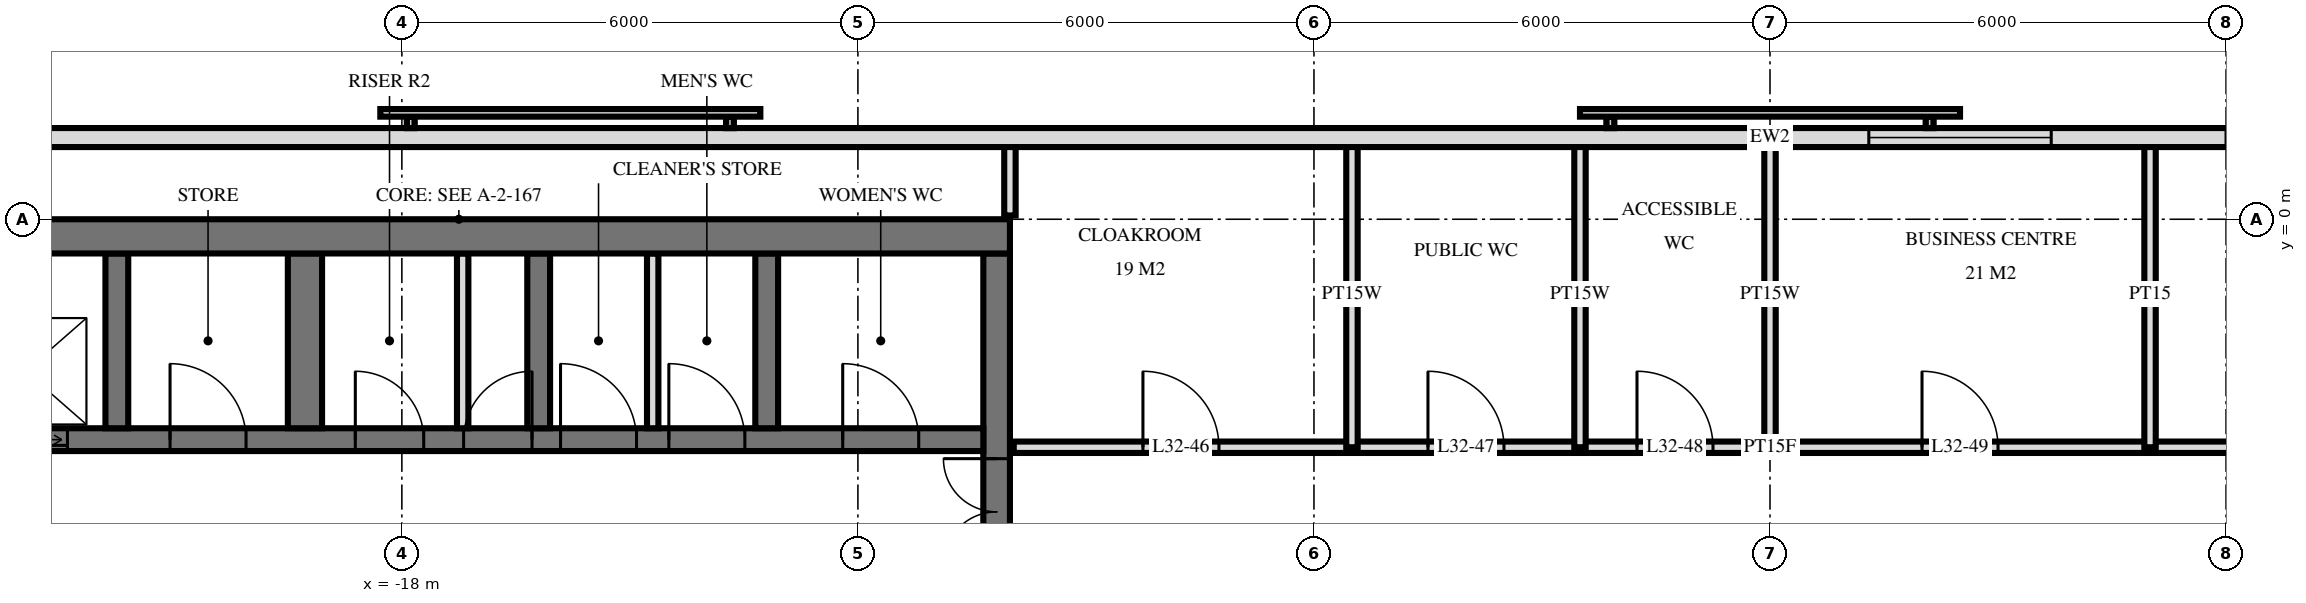
"""IFC4 building model, lengths in metres.
Left out: names, types, materials, properties, quantities, classifications, styles, units other than length and angle.
Written with IfcOpenShell. Run it as: python <this file> out.ifc"""

import sys

from ifc_helpers import new_model, si_unit, direction, frame, frame_2d, origin, place, context, subcontext, project, spatial, rectangle, extrude, element, fill, save


model = new_model("IFC4")
c1 = context("Model", 3, precision=1e-05, world=origin(), true_north=direction((0.0, 1.0)))
c2 = subcontext(c1, "Body", "Model", "MODEL_VIEW")
j1 = project(units=[si_unit("LENGTHUNIT", "METRE"), si_unit("PLANEANGLEUNIT", "RADIAN")], contexts=[c1])
p1 = place(None, origin())
s1 = spatial("IfcSite", under=j1, at=p1, CompositionType="ELEMENT")
p2 = place(p1, origin())
s2 = spatial("IfcBuilding", under=s1, at=p2, CompositionType="ELEMENT")
p3 = place(p2, frame((0.0, 0.0, 127.2)))
s3 = spatial("IfcBuildingStorey", under=s2, at=p3, CompositionType="ELEMENT", Elevation=127.2)
p4 = place(p3, frame((-24.5, -0.225, 0.0), z_axis=(0.0, 0.0, 1.0), x_axis=(1.0, 0.0, 0.0)))
e1 = element("IfcWall", 1, at=p4, inside=s3, PredefinedType="SHEAR", context=c2, shape_type="SweptSolid", body=[
    extrude(rectangle(XDim=14.5, YDim=0.45, at=frame_2d((7.25, 0.0))), origin(), (0.0, 0.0, 1.0), 3.6),
])
p5 = place(p3, frame((-10.175, -14.55, 0.0), z_axis=(0.0, 0.0, 1.0), x_axis=(0.0, 1.0, 0.0)))
e2 = element("IfcWall", 2, at=p5, inside=s3, PredefinedType="SHEAR", context=c2, shape_type="SweptSolid", body=[
    extrude(rectangle(XDim=14.1, YDim=0.35, at=frame_2d((7.05, 0.0))), origin(), (0.0, 0.0, 1.0), 3.6),
])
p6 = place(p5, frame((8.4, 0.0, 0.0)))
e3 = element("IfcOpeningElement", 3, at=p6, cuts=e2, PredefinedType="OPENING", context=c2, shape_type="SweptSolid", body=[
    extrude(rectangle(XDim=1.4, YDim=2.4, at=frame_2d((0.7, 1.2))), frame((0.0, 0.185, 0.0), z_axis=(0.0, -1.0, 0.0), x_axis=(1.0, 0.0, 0.0)), (0.0, 0.0, 1.0), 0.37),
])
p7 = place(p5, frame((10.0, 0.0, 0.0)))
e4 = element("IfcOpeningElement", 4, at=p7, cuts=e2, PredefinedType="OPENING", context=c2, shape_type="SweptSolid", body=[
    extrude(rectangle(XDim=1.4, YDim=2.4, at=frame_2d((0.7, 1.2))), frame((0.0, 0.185, 0.0), z_axis=(0.0, -1.0, 0.0), x_axis=(1.0, 0.0, 0.0)), (0.0, 0.0, 1.0), 0.37),
])
p8 = place(p5, frame((4.0, 0.0, 0.0)))
e5 = element("IfcOpeningElement", 5, at=p8, cuts=e2, PredefinedType="OPENING", context=c2, shape_type="SweptSolid", body=[
    extrude(rectangle(XDim=1.2, YDim=2.1, at=frame_2d((0.6, 1.05))), frame((0.0, 0.185, 0.0), z_axis=(0.0, -1.0, 0.0), x_axis=(1.0, 0.0, 0.0)), (0.0, 0.0, 1.0), 0.37),
])
p9 = place(p3, frame((-24.05, -2.9, 0.0), z_axis=(0.0, 0.0, 1.0), x_axis=(1.0, 0.0, 0.0)))
e6 = element("IfcWall", 6, at=p9, inside=s3, PredefinedType="SHEAR", context=c2, shape_type="SweptSolid", body=[
    extrude(rectangle(XDim=13.7, YDim=0.3, at=frame_2d((6.85, 0.0))), origin(), (0.0, 0.0, 1.0), 3.6),
])
p10 = place(p9, frame((0.55, 0.0, 0.0)))
e7 = element("IfcOpeningElement", 7, at=p10, cuts=e6, PredefinedType="OPENING", context=c2, shape_type="SweptSolid", body=[
    extrude(rectangle(XDim=1.1, YDim=2.1, at=frame_2d((0.55, 1.05))), frame((0.0, 0.16, 0.0), z_axis=(0.0, -1.0, 0.0), x_axis=(1.0, 0.0, 0.0)), (0.0, 0.0, 1.0), 0.32),
])
p11 = place(p9, frame((6.863, 0.0, 0.0)))
e8 = element("IfcOpeningElement", 8, at=p11, cuts=e6, PredefinedType="OPENING", context=c2, shape_type="SweptSolid", body=[
    extrude(rectangle(XDim=0.9, YDim=2.1, at=frame_2d((0.45, 1.05))), frame((0.0, 0.16, 0.0), z_axis=(0.0, -1.0, 0.0), x_axis=(1.0, 0.0, 0.0)), (0.0, 0.0, 1.0), 0.32),
])
p12 = place(p9, frame((5.438, 0.0, 0.0)))
e9 = element("IfcOpeningElement", 9, at=p12, cuts=e6, PredefinedType="OPENING", context=c2, shape_type="SweptSolid", body=[
    extrude(rectangle(XDim=0.9, YDim=2.1, at=frame_2d((0.45, 1.05))), frame((0.0, 0.16, 0.0), z_axis=(0.0, -1.0, 0.0), x_axis=(1.0, 0.0, 0.0)), (0.0, 0.0, 1.0), 0.32),
])
p13 = place(p9, frame((11.85, 0.0, 0.0)))
e10 = element("IfcOpeningElement", 10, at=p13, cuts=e6, PredefinedType="OPENING", context=c2, shape_type="SweptSolid", body=[
    extrude(rectangle(XDim=1.0, YDim=2.1, at=frame_2d((0.5, 1.05))), frame((0.0, 0.16, 0.0), z_axis=(0.0, -1.0, 0.0), x_axis=(1.0, 0.0, 0.0)), (0.0, 0.0, 1.0), 0.32),
])
p14 = place(p9, frame((9.562, 0.0, 0.0)))
e11 = element("IfcOpeningElement", 11, at=p14, cuts=e6, PredefinedType="OPENING", context=c2, shape_type="SweptSolid", body=[
    extrude(rectangle(XDim=1.0, YDim=2.1, at=frame_2d((0.5, 1.05))), frame((0.0, 0.16, 0.0), z_axis=(0.0, -1.0, 0.0), x_axis=(1.0, 0.0, 0.0)), (0.0, 0.0, 1.0), 0.32),
])
p15 = place(p9, frame((8.137, 0.0, 0.0)))
e12 = element("IfcOpeningElement", 12, at=p15, cuts=e6, PredefinedType="OPENING", context=c2, shape_type="SweptSolid", body=[
    extrude(rectangle(XDim=1.0, YDim=2.1, at=frame_2d((0.5, 1.05))), frame((0.0, 0.16, 0.0), z_axis=(0.0, -1.0, 0.0), x_axis=(1.0, 0.0, 0.0)), (0.0, 0.0, 1.0), 0.32),
])
p16 = place(p9, frame((3.0, 0.0, 0.0)))
e13 = element("IfcOpeningElement", 13, at=p16, cuts=e6, PredefinedType="OPENING", context=c2, shape_type="SweptSolid", body=[
    extrude(rectangle(XDim=1.0, YDim=2.1, at=frame_2d((0.5, 1.05))), frame((0.0, 0.16, 0.0), z_axis=(0.0, -1.0, 0.0), x_axis=(1.0, 0.0, 0.0)), (0.0, 0.0, 1.0), 0.32),
])
for number, where, z_axis, x_axis in (
    (14, (-13.2, -2.75, 0.0), (0.0, 0.0, 1.0), (0.0, 1.0, 0.0)),
    (15, (-16.2, -2.75, 0.0), (0.0, 0.0, 1.0), (0.0, 1.0, 0.0)),
):
    element("IfcWall", number, at=place(p3, frame(where, z_axis=z_axis, x_axis=x_axis)), inside=s3, PredefinedType="SHEAR", context=c2, shape_type="SweptSolid", body=[
        extrude(rectangle(XDim=2.3, YDim=0.3, at=frame_2d((1.15, 0.0))), origin(), (0.0, 0.0, 1.0), 3.6),
    ])
p17 = place(p3, frame((-19.275, -2.75, 0.0), z_axis=(0.0, 0.0, 1.0), x_axis=(0.0, 1.0, 0.0)))
e16 = element("IfcWall", 16, at=p17, inside=s3, PredefinedType="SHEAR", context=c2, shape_type="SweptSolid", body=[
    extrude(rectangle(XDim=2.3, YDim=0.45, at=frame_2d((1.15, 0.0))), origin(), (0.0, 0.0, 1.0), 3.6),
])
p18 = place(p3, frame((-21.75, -2.75, 0.0), z_axis=(0.0, 0.0, 1.0), x_axis=(0.0, 1.0, 0.0)))
e17 = element("IfcWall", 17, at=p18, inside=s3, PredefinedType="SHEAR", context=c2, shape_type="SweptSolid", body=[
    extrude(rectangle(XDim=2.3, YDim=0.3, at=frame_2d((1.15, 0.0))), origin(), (0.0, 0.0, 1.0), 3.6),
])
p19 = place(p3, frame((23.675, 1.075, 0.0), z_axis=(0.0, 0.0, 1.0), x_axis=(-1.0, 0.0, 0.0)))
e18 = element("IfcWall", 18, at=p19, inside=s3, PredefinedType="SOLIDWALL", context=c2, shape_type="SweptSolid", body=[
    extrude(rectangle(XDim=47.351, YDim=0.25, at=frame_2d((23.675, 0.0))), origin(), (0.0, 0.0, 1.0), 3.32),
])
p20 = place(p19, frame((15.275, 0.0, 0.3)))
e19 = element("IfcOpeningElement", 19, at=p20, cuts=e18, PredefinedType="OPENING", context=c2, shape_type="SweptSolid", body=[
    extrude(rectangle(XDim=2.4, YDim=2.1, at=frame_2d((1.2, 1.05))), frame((0.0, 0.135, 0.0), z_axis=(0.0, -1.0, 0.0), x_axis=(1.0, 0.0, 0.0)), (0.0, 0.0, 1.0), 0.27),
])
p21 = place(p19, frame((19.975, 0.0, 0.3)))
e20 = element("IfcOpeningElement", 20, at=p21, cuts=e18, PredefinedType="OPENING", context=c2, shape_type="SweptSolid", body=[
    extrude(rectangle(XDim=2.4, YDim=2.1, at=frame_2d((1.2, 1.05))), frame((0.0, 0.135, 0.0), z_axis=(0.0, -1.0, 0.0), x_axis=(1.0, 0.0, 0.0)), (0.0, 0.0, 1.0), 0.27),
])
for number, where, z_axis, x_axis in (
    (21, (-17.2, -2.75, 0.0), (0.0, 0.0, 1.0), (0.0, 1.0, 0.0)),
    (22, (-14.7, -2.75, 0.0), (0.0, 0.0, 1.0), (0.0, 1.0, 0.0)),
):
    element("IfcWall", number, at=place(p3, frame(where, z_axis=z_axis, x_axis=x_axis)), inside=s3, PredefinedType="PARTITIONING", context=c2, shape_type="SweptSolid", body=[
        extrude(rectangle(XDim=2.3, YDim=0.15, at=frame_2d((1.15, 0.0))), origin(), (0.0, 0.0, 1.0), 3.3),
    ])
p22 = place(p3, frame((5.0, -3.0, 0.0), z_axis=(0.0, 0.0, 1.0), x_axis=(0.0, 1.0, 0.0)))
e23 = element("IfcWall", 23, at=p22, inside=s3, PredefinedType="PARTITIONING", context=c2, shape_type="SweptSolid", body=[
    extrude(rectangle(XDim=4.02, YDim=0.15, at=frame_2d((2.01, 0.0))), origin(), (0.0, 0.0, 1.0), 3.32),
])
for number, where, z_axis, x_axis in (
    (24, (0.0, -3.0, 0.0), (0.0, 0.0, 1.0), (0.0, 1.0, 0.0)),
    (25, (-2.5, -3.0, 0.0), (0.0, 0.0, 1.0), (0.0, 1.0, 0.0)),
    (26, (-5.5, -3.0, 0.0), (0.0, 0.0, 1.0), (0.0, 1.0, 0.0)),
):
    element("IfcWall", number, at=place(p3, frame(where, z_axis=z_axis, x_axis=x_axis)), inside=s3, PredefinedType="PLUMBINGWALL", context=c2, shape_type="SweptSolid", body=[
        extrude(rectangle(XDim=4.02, YDim=0.15, at=frame_2d((2.01, 0.0))), origin(), (0.0, 0.0, 1.0), 3.32),
    ])
p23 = place(p3, frame((-10.0, 0.05, 0.0), z_axis=(0.0, 0.0, 1.0), x_axis=(0.0, 1.0, 0.0)))
e27 = element("IfcWall", 27, at=p23, inside=s3, PredefinedType="PARTITIONING", context=c2, shape_type="SweptSolid", body=[
    extrude(rectangle(XDim=0.97, YDim=0.15, at=frame_2d((0.485, 0.0))), origin(), (0.0, 0.0, 1.0), 3.32),
])
p24 = place(p3, frame((-9.95, -3.0, 0.0), z_axis=(0.0, 0.0, 1.0), x_axis=(1.0, 0.0, 0.0)))
e28 = element("IfcWall", 28, at=p24, inside=s3, PredefinedType="PARTITIONING", context=c2, shape_type="SweptSolid", body=[
    extrude(rectangle(XDim=19.9, YDim=0.15, at=frame_2d((9.95, 0.0))), origin(), (0.0, 0.0, 1.0), 3.32),
])
p25 = place(p24, frame((1.7, 0.0, 0.0)))
e29 = element("IfcOpeningElement", 29, at=p25, cuts=e28, PredefinedType="OPENING", context=c2, shape_type="SweptSolid", body=[
    extrude(rectangle(XDim=1.0, YDim=2.1, at=frame_2d((0.5, 1.05))), frame((0.0, 0.085, 0.0), z_axis=(0.0, -1.0, 0.0), x_axis=(1.0, 0.0, 0.0)), (0.0, 0.0, 1.0), 0.17),
])
p26 = place(p24, frame((5.45, 0.0, 0.0)))
e30 = element("IfcOpeningElement", 30, at=p26, cuts=e28, PredefinedType="OPENING", context=c2, shape_type="SweptSolid", body=[
    extrude(rectangle(XDim=1.0, YDim=2.1, at=frame_2d((0.5, 1.05))), frame((0.0, 0.085, 0.0), z_axis=(0.0, -1.0, 0.0), x_axis=(1.0, 0.0, 0.0)), (0.0, 0.0, 1.0), 0.17),
])
p27 = place(p24, frame((8.2, 0.0, 0.0)))
e31 = element("IfcOpeningElement", 31, at=p27, cuts=e28, PredefinedType="OPENING", context=c2, shape_type="SweptSolid", body=[
    extrude(rectangle(XDim=1.0, YDim=2.1, at=frame_2d((0.5, 1.05))), frame((0.0, 0.085, 0.0), z_axis=(0.0, -1.0, 0.0), x_axis=(1.0, 0.0, 0.0)), (0.0, 0.0, 1.0), 0.17),
])
p28 = place(p24, frame((11.95, 0.0, 0.0)))
e32 = element("IfcOpeningElement", 32, at=p28, cuts=e28, PredefinedType="OPENING", context=c2, shape_type="SweptSolid", body=[
    extrude(rectangle(XDim=1.0, YDim=2.1, at=frame_2d((0.5, 1.05))), frame((0.0, 0.085, 0.0), z_axis=(0.0, -1.0, 0.0), x_axis=(1.0, 0.0, 0.0)), (0.0, 0.0, 1.0), 0.17),
])
p29 = place(p24, frame((16.95, 0.0, 0.0)))
e33 = element("IfcOpeningElement", 33, at=p29, cuts=e28, PredefinedType="OPENING", context=c2, shape_type="SweptSolid", body=[
    extrude(rectangle(XDim=1.0, YDim=2.1, at=frame_2d((0.5, 1.05))), frame((0.0, 0.085, 0.0), z_axis=(0.0, -1.0, 0.0), x_axis=(1.0, 0.0, 0.0)), (0.0, 0.0, 1.0), 0.17),
])
p30 = place(p21, origin())
e34 = element("IfcWindow", 34, at=p30, inside=s3, PartitioningType="SINGLE_PANEL", PredefinedType="WINDOW", context=c2, shape_type="SweptSolid", body=[
    extrude(rectangle(XDim=2.4, YDim=2.1, at=frame_2d((1.2, 1.05))), frame((0.0, 0.03, 0.0), z_axis=(0.0, -1.0, 0.0), x_axis=(1.0, 0.0, 0.0)), (0.0, 0.0, 1.0), 0.06),
])
fill(e20, e34)
p31 = place(p10, origin())
e35 = element("IfcDoor", 35, at=p31, inside=s3, OperationType="DOUBLE_DOOR_SLIDING", PredefinedType="USERDEFINED", context=c2, shape_type="SweptSolid", body=[
    extrude(rectangle(XDim=1.1, YDim=2.1, at=frame_2d((0.55, 1.05))), frame((0.0, 0.025, 0.0), z_axis=(0.0, -1.0, 0.0), x_axis=(1.0, 0.0, 0.0)), (0.0, 0.0, 1.0), 0.05),
])
fill(e7, e35)
p32 = place(p7, origin())
e36 = element("IfcDoor", 36, at=p32, inside=s3, OperationType="DOUBLE_DOOR_SINGLE_SWING", PredefinedType="DOOR", context=c2, shape_type="SweptSolid", body=[
    extrude(rectangle(XDim=1.4, YDim=2.4, at=frame_2d((0.7, 1.2))), frame((0.0, 0.025, 0.0), z_axis=(0.0, -1.0, 0.0), x_axis=(1.0, 0.0, 0.0)), (0.0, 0.0, 1.0), 0.05),
])
fill(e4, e36)
p33 = place(p11, origin())
e37 = element("IfcDoor", 37, at=p33, inside=s3, OperationType="SINGLE_SWING_LEFT", PredefinedType="DOOR", context=c2, shape_type="SweptSolid", body=[
    extrude(rectangle(XDim=0.9, YDim=2.1, at=frame_2d((0.45, 1.05))), frame((0.0, 0.025, 0.0), z_axis=(0.0, -1.0, 0.0), x_axis=(1.0, 0.0, 0.0)), (0.0, 0.0, 1.0), 0.05),
])
fill(e8, e37)
p34 = place(p12, origin())
e38 = element("IfcDoor", 38, at=p34, inside=s3, OperationType="SINGLE_SWING_RIGHT", PredefinedType="DOOR", context=c2, shape_type="SweptSolid", body=[
    extrude(rectangle(XDim=0.9, YDim=2.1, at=frame_2d((0.45, 1.05))), frame((0.0, 0.025, 0.0), z_axis=(0.0, -1.0, 0.0), x_axis=(1.0, 0.0, 0.0)), (0.0, 0.0, 1.0), 0.05),
])
fill(e9, e38)
p35 = place(p13, origin())
e39 = element("IfcDoor", 39, at=p35, inside=s3, OperationType="SINGLE_SWING_RIGHT", PredefinedType="DOOR", context=c2, shape_type="SweptSolid", body=[
    extrude(rectangle(XDim=1.0, YDim=2.1, at=frame_2d((0.5, 1.05))), frame((0.0, 0.025, 0.0), z_axis=(0.0, -1.0, 0.0), x_axis=(1.0, 0.0, 0.0)), (0.0, 0.0, 1.0), 0.05),
])
fill(e10, e39)
p36 = place(p14, origin())
e40 = element("IfcDoor", 40, at=p36, inside=s3, OperationType="SINGLE_SWING_RIGHT", PredefinedType="DOOR", context=c2, shape_type="SweptSolid", body=[
    extrude(rectangle(XDim=1.0, YDim=2.1, at=frame_2d((0.5, 1.05))), frame((0.0, 0.025, 0.0), z_axis=(0.0, -1.0, 0.0), x_axis=(1.0, 0.0, 0.0)), (0.0, 0.0, 1.0), 0.05),
])
fill(e11, e40)
p37 = place(p15, origin())
e41 = element("IfcDoor", 41, at=p37, inside=s3, OperationType="SINGLE_SWING_RIGHT", PredefinedType="DOOR", context=c2, shape_type="SweptSolid", body=[
    extrude(rectangle(XDim=1.0, YDim=2.1, at=frame_2d((0.5, 1.05))), frame((0.0, 0.025, 0.0), z_axis=(0.0, -1.0, 0.0), x_axis=(1.0, 0.0, 0.0)), (0.0, 0.0, 1.0), 0.05),
])
fill(e12, e41)
p38 = place(p16, origin())
e42 = element("IfcDoor", 42, at=p38, inside=s3, OperationType="SINGLE_SWING_RIGHT", PredefinedType="DOOR", context=c2, shape_type="SweptSolid", body=[
    extrude(rectangle(XDim=1.0, YDim=2.1, at=frame_2d((0.5, 1.05))), frame((0.0, 0.025, 0.0), z_axis=(0.0, -1.0, 0.0), x_axis=(1.0, 0.0, 0.0)), (0.0, 0.0, 1.0), 0.05),
])
fill(e13, e42)
p39 = place(p25, origin())
e43 = element("IfcDoor", 43, at=p39, inside=s3, OperationType="SINGLE_SWING_RIGHT", PredefinedType="DOOR", context=c2, shape_type="SweptSolid", body=[
    extrude(rectangle(XDim=1.0, YDim=2.1, at=frame_2d((0.5, 1.05))), frame((0.0, 0.025, 0.0), z_axis=(0.0, -1.0, 0.0), x_axis=(1.0, 0.0, 0.0)), (0.0, 0.0, 1.0), 0.05),
])
fill(e29, e43)
p40 = place(p26, origin())
e44 = element("IfcDoor", 44, at=p40, inside=s3, OperationType="SINGLE_SWING_RIGHT", PredefinedType="DOOR", context=c2, shape_type="SweptSolid", body=[
    extrude(rectangle(XDim=1.0, YDim=2.1, at=frame_2d((0.5, 1.05))), frame((0.0, 0.025, 0.0), z_axis=(0.0, -1.0, 0.0), x_axis=(1.0, 0.0, 0.0)), (0.0, 0.0, 1.0), 0.05),
])
fill(e30, e44)
p41 = place(p27, origin())
e45 = element("IfcDoor", 45, at=p41, inside=s3, OperationType="SINGLE_SWING_RIGHT", PredefinedType="DOOR", context=c2, shape_type="SweptSolid", body=[
    extrude(rectangle(XDim=1.0, YDim=2.1, at=frame_2d((0.5, 1.05))), frame((0.0, 0.025, 0.0), z_axis=(0.0, -1.0, 0.0), x_axis=(1.0, 0.0, 0.0)), (0.0, 0.0, 1.0), 0.05),
])
fill(e31, e45)
p42 = place(p28, origin())
e46 = element("IfcDoor", 46, at=p42, inside=s3, OperationType="SINGLE_SWING_RIGHT", PredefinedType="DOOR", context=c2, shape_type="SweptSolid", body=[
    extrude(rectangle(XDim=1.0, YDim=2.1, at=frame_2d((0.5, 1.05))), frame((0.0, 0.025, 0.0), z_axis=(0.0, -1.0, 0.0), x_axis=(1.0, 0.0, 0.0)), (0.0, 0.0, 1.0), 0.05),
])
fill(e32, e46)
save(model, sys.argv[1])
